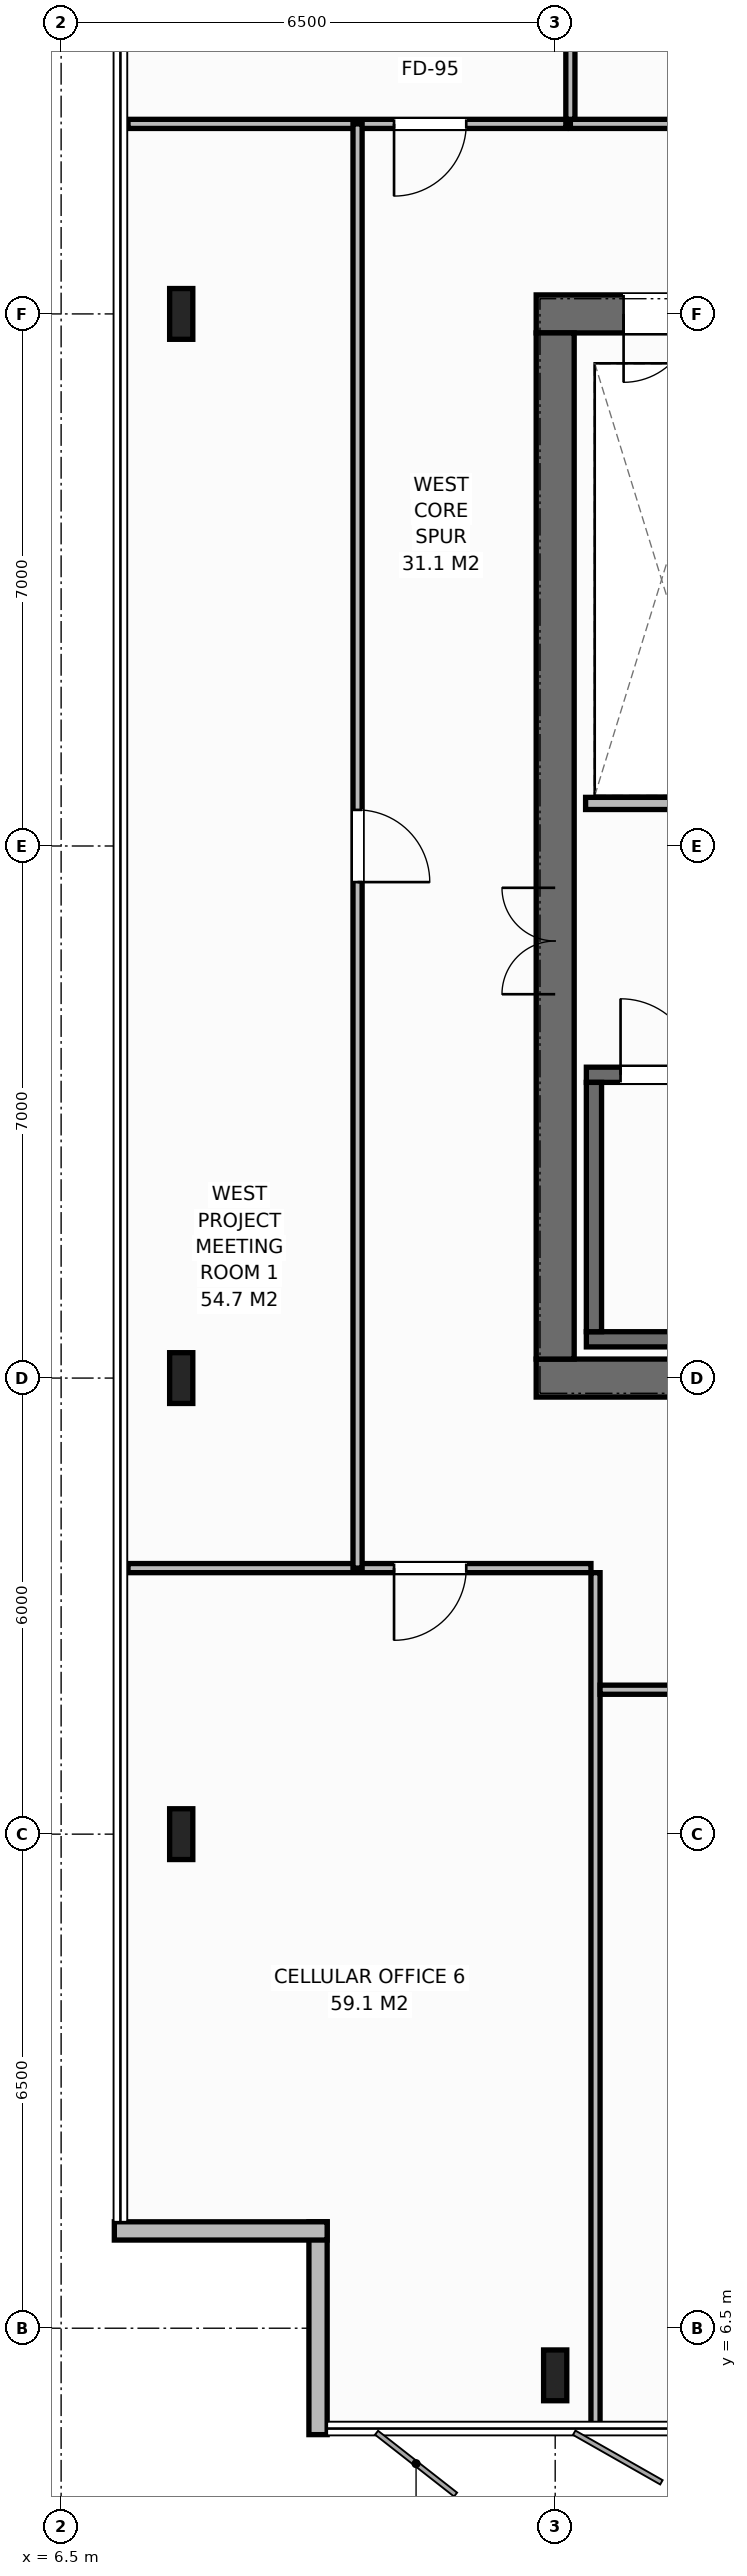
"""IFC4 building model, lengths in metres.
Left out: names, types, materials, properties, quantities, classifications, styles, units other than length and angle.
Written with IfcOpenShell. Run it as: python <this file> out.ifc"""

import sys

from ifc_helpers import new_model, si_unit, direction, frame, frame_2d, origin, origin_2d, place, context, subcontext, project, spatial, rectangle, i_section, extrude, element, fill, save


model = new_model("IFC4")
c1 = context("Model", 3, precision=1e-05, world=origin(), true_north=direction((0.0, 1.0)))
c2 = subcontext(c1, "Body", "Model", "MODEL_VIEW")
j1 = project(units=[si_unit("LENGTHUNIT", "METRE"), si_unit("PLANEANGLEUNIT", "RADIAN")], contexts=[c1])
p1 = place(None, origin())
s1 = spatial("IfcSite", under=j1, at=p1, CompositionType="ELEMENT")
p2 = place(p1, origin())
s2 = spatial("IfcBuilding", under=s1, at=p2, CompositionType="ELEMENT")
p3 = place(p2, frame((0.0, 0.0, 302.4)))
s3 = spatial("IfcBuildingStorey", under=s2, at=p3, CompositionType="ELEMENT", Elevation=302.4)
p4 = place(p3, frame((12.75, 19.0, 0.0), z_axis=(0.0, 0.0, 1.0), x_axis=(1.0, 0.0, 0.0)))
e1 = element("IfcWall", 1, at=p4, inside=s3, PredefinedType="SHEAR", context=c2, shape_type="SweptSolid", body=[
    extrude(rectangle(XDim=13.5, YDim=0.5, at=frame_2d((6.75, 0.0))), origin(), (0.0, 0.0, 1.0), 4.0),
])
p5 = place(p4, frame((9.13, 0.0, 0.0)))
e2 = element("IfcOpeningElement", 2, at=p5, cuts=e1, PredefinedType="OPENING", context=c2, shape_type="SweptSolid", body=[
    extrude(rectangle(XDim=1.4, YDim=2.2, at=frame_2d((0.7, 1.1))), frame((0.0, 0.26, 0.0), z_axis=(0.0, -1.0, 0.0), x_axis=(1.0, 0.0, 0.0)), (0.0, 0.0, 1.0), 0.52),
])
p6 = place(p3, frame((12.75, 33.0, 0.0), z_axis=(0.0, 0.0, 1.0), x_axis=(1.0, 0.0, 0.0)))
e3 = element("IfcWall", 3, at=p6, inside=s3, PredefinedType="SHEAR", context=c2, shape_type="SweptSolid", body=[
    extrude(rectangle(XDim=13.5, YDim=0.5, at=frame_2d((6.75, 0.0))), origin(), (0.0, 0.0, 1.0), 4.0),
])
p7 = place(p6, frame((1.15, 0.0, 0.0)))
e4 = element("IfcOpeningElement", 4, at=p7, cuts=e3, PredefinedType="OPENING", context=c2, shape_type="SweptSolid", body=[
    extrude(rectangle(XDim=0.9, YDim=2.15, at=frame_2d((0.45, 1.075))), frame((0.0, 0.26, 0.0), z_axis=(0.0, -1.0, 0.0), x_axis=(1.0, 0.0, 0.0)), (0.0, 0.0, 1.0), 0.52),
])
p8 = place(p6, frame((3.2, 0.0, 0.0)))
e5 = element("IfcOpeningElement", 5, at=p8, cuts=e3, PredefinedType="OPENING", context=c2, shape_type="SweptSolid", body=[
    extrude(rectangle(XDim=0.95, YDim=2.15, at=frame_2d((0.475, 1.075))), frame((0.0, 0.26, 0.0), z_axis=(0.0, -1.0, 0.0), x_axis=(1.0, 0.0, 0.0)), (0.0, 0.0, 1.0), 0.52),
])
p9 = place(p6, frame((6.05, 0.0, 0.0)))
e6 = element("IfcOpeningElement", 6, at=p9, cuts=e3, PredefinedType="OPENING", context=c2, shape_type="SweptSolid", body=[
    extrude(rectangle(XDim=0.95, YDim=2.15, at=frame_2d((0.475, 1.075))), frame((0.0, 0.26, 0.0), z_axis=(0.0, -1.0, 0.0), x_axis=(1.0, 0.0, 0.0)), (0.0, 0.0, 1.0), 0.52),
])
p10 = place(p6, frame((9.13, 0.0, 0.0)))
e7 = element("IfcOpeningElement", 7, at=p10, cuts=e3, PredefinedType="OPENING", context=c2, shape_type="SweptSolid", body=[
    extrude(rectangle(XDim=1.4, YDim=2.2, at=frame_2d((0.7, 1.1))), frame((0.0, 0.26, 0.0), z_axis=(0.0, -1.0, 0.0), x_axis=(1.0, 0.0, 0.0)), (0.0, 0.0, 1.0), 0.52),
])
p11 = place(p3, frame((13.0, 19.25, 0.0), z_axis=(0.0, 0.0, 1.0), x_axis=(0.0, 1.0, 0.0)))
e8 = element("IfcWall", 8, at=p11, inside=s3, PredefinedType="SHEAR", context=c2, shape_type="SweptSolid", body=[
    extrude(rectangle(XDim=13.5, YDim=0.5, at=frame_2d((6.75, 0.0))), origin(), (0.0, 0.0, 1.0), 4.0),
])
p12 = place(p11, frame((4.8, 0.0, 0.0)))
e9 = element("IfcOpeningElement", 9, at=p12, cuts=e8, PredefinedType="OPENING", context=c2, shape_type="SweptSolid", body=[
    extrude(rectangle(XDim=1.4, YDim=2.2, at=frame_2d((0.7, 1.1))), frame((0.0, 0.26, 0.0), z_axis=(0.0, -1.0, 0.0), x_axis=(1.0, 0.0, 0.0)), (0.0, 0.0, 1.0), 0.52),
])
p13 = place(p3, frame((13.41, 19.51, 0.0), z_axis=(0.0, 0.0, 1.0), x_axis=(1.0, 0.0, 0.0)))
e10 = element("IfcWall", 10, at=p13, inside=s3, PredefinedType="SHEAR", context=c2, shape_type="SweptSolid", body=[
    extrude(rectangle(XDim=8.43, YDim=0.2, at=frame_2d((4.215, 0.0))), origin(), (0.0, 0.0, 1.0), 4.0),
])
p14 = place(p3, frame((13.41, 22.99, 0.0), z_axis=(0.0, 0.0, 1.0), x_axis=(1.0, 0.0, 0.0)))
e11 = element("IfcWall", 11, at=p14, inside=s3, PredefinedType="SHEAR", context=c2, shape_type="SweptSolid", body=[
    extrude(rectangle(XDim=8.43, YDim=0.2, at=frame_2d((4.215, 0.0))), origin(), (0.0, 0.0, 1.0), 4.0),
])
p15 = place(p14, frame((0.45, 0.0, 0.0)))
e12 = element("IfcOpeningElement", 12, at=p15, cuts=e11, PredefinedType="OPENING", context=c2, shape_type="SweptSolid", body=[
    extrude(rectangle(XDim=1.0, YDim=2.15, at=frame_2d((0.5, 1.075))), frame((0.0, 0.11, 0.0), z_axis=(0.0, -1.0, 0.0), x_axis=(1.0, 0.0, 0.0)), (0.0, 0.0, 1.0), 0.22),
])
p16 = place(p3, frame((13.51, 19.61, 0.0), z_axis=(0.0, 0.0, 1.0), x_axis=(0.0, 1.0, 0.0)))
e13 = element("IfcWall", 13, at=p16, inside=s3, PredefinedType="SHEAR", context=c2, shape_type="SweptSolid", body=[
    extrude(rectangle(XDim=3.28, YDim=0.2, at=frame_2d((1.64, 0.0))), origin(), (0.0, 0.0, 1.0), 4.0),
])
for number, where, z_axis, x_axis in (
    (14, (13.0, 5.88, 0.0), (0.0, 0.0, 1.0), (1.0, 0.0, 0.0)),
    (15, (8.08, 13.0, 0.0), (0.0, 0.0, 1.0), (1.0, 0.0, 0.0)),
    (16, (8.08, 19.0, 0.0), (0.0, 0.0, 1.0), (1.0, 0.0, 0.0)),
    (17, (8.08, 33.0, 0.0), (0.0, 0.0, 1.0), (1.0, 0.0, 0.0)),
):
    element("IfcColumn", number, at=place(p3, frame(where, z_axis=z_axis, x_axis=x_axis)), inside=s3, PredefinedType="COLUMN", context=c2, shape_type="SweptSolid", body=[
        extrude(i_section(OverallWidth=0.305, OverallDepth=0.668, WebThickness=0.021, FlangeThickness=0.04, at=origin_2d()), origin(), (0.0, 0.0, 1.0), 4.0),
    ])
p17 = place(p3, frame((9.88, 5.1, 0.0), z_axis=(0.0, 0.0, 1.0), x_axis=(0.0, 1.0, 0.0)))
e18 = element("IfcWall", 18, at=p17, inside=s3, PredefinedType="STANDARD", context=c2, shape_type="SweptSolid", body=[
    extrude(rectangle(XDim=2.8, YDim=0.24, at=frame_2d((1.4, 0.0))), origin(), (0.0, 0.0, 1.0), 3.788),
])
p18 = place(p3, frame((10.0, 7.78, 0.0), z_axis=(0.0, 0.0, 1.0), x_axis=(-1.0, 0.0, 0.0)))
e19 = element("IfcWall", 19, at=p18, inside=s3, PredefinedType="STANDARD", context=c2, shape_type="SweptSolid", body=[
    extrude(rectangle(XDim=2.8, YDim=0.24, at=frame_2d((1.4, 0.0))), origin(), (0.0, 0.0, 1.0), 3.788),
])
p19 = place(p3, frame((13.4, 26.56, 0.0), z_axis=(0.0, 0.0, 1.0), x_axis=(1.0, 0.0, 0.0)))
e20 = element("IfcWall", 20, at=p19, inside=s3, PredefinedType="STANDARD", context=c2, shape_type="SweptSolid", body=[
    extrude(rectangle(XDim=8.34, YDim=0.16, at=frame_2d((4.17, 0.0))), origin(), (0.0, 0.0, 1.0), 3.788),
])
p20 = place(p3, frame((13.2, 35.5, 0.0), z_axis=(0.0, 0.0, 1.0), x_axis=(1.0, 0.0, 0.0)))
e21 = element("IfcWall", 21, at=p20, inside=s3, PredefinedType="PARTITIONING", context=c2, shape_type="SweptSolid", body=[
    extrude(rectangle(XDim=13.16, YDim=0.12, at=frame_2d((6.58, 0.0))), origin(), (0.0, 0.0, 1.0), 3.788),
])
p21 = place(p20, frame((1.35, 0.0, 0.0)))
e22 = element("IfcOpeningElement", 22, at=p21, cuts=e21, PredefinedType="OPENING", context=c2, shape_type="SweptSolid", body=[
    extrude(rectangle(XDim=0.9, YDim=2.15, at=frame_2d((0.45, 1.075))), frame((0.0, 0.07, 0.0), z_axis=(0.0, -1.0, 0.0), x_axis=(1.0, 0.0, 0.0)), (0.0, 0.0, 1.0), 0.14),
])
p22 = place(p20, frame((4.05, 0.0, 0.0)))
e23 = element("IfcOpeningElement", 23, at=p22, cuts=e21, PredefinedType="OPENING", context=c2, shape_type="SweptSolid", body=[
    extrude(rectangle(XDim=0.9, YDim=2.15, at=frame_2d((0.45, 1.075))), frame((0.0, 0.07, 0.0), z_axis=(0.0, -1.0, 0.0), x_axis=(1.0, 0.0, 0.0)), (0.0, 0.0, 1.0), 0.14),
])
p23 = place(p20, frame((8.25, 0.0, 0.0)))
e24 = element("IfcOpeningElement", 24, at=p23, cuts=e21, PredefinedType="OPENING", context=c2, shape_type="SweptSolid", body=[
    extrude(rectangle(XDim=0.9, YDim=2.15, at=frame_2d((0.45, 1.075))), frame((0.0, 0.07, 0.0), z_axis=(0.0, -1.0, 0.0), x_axis=(1.0, 0.0, 0.0)), (0.0, 0.0, 1.0), 0.14),
])
p24 = place(p20, frame((11.0, 0.0, 0.0)))
e25 = element("IfcOpeningElement", 25, at=p24, cuts=e21, PredefinedType="OPENING", context=c2, shape_type="SweptSolid", body=[
    extrude(rectangle(XDim=0.95, YDim=2.15, at=frame_2d((0.475, 1.075))), frame((0.0, 0.07, 0.0), z_axis=(0.0, -1.0, 0.0), x_axis=(1.0, 0.0, 0.0)), (0.0, 0.0, 1.0), 0.14),
])
p25 = place(p3, frame((13.2, 35.56, 0.0), z_axis=(0.0, 0.0, 1.0), x_axis=(0.0, 1.0, 0.0)))
e26 = element("IfcWall", 26, at=p25, inside=s3, PredefinedType="PARTITIONING", context=c2, shape_type="SweptSolid", body=[
    extrude(rectangle(XDim=11.32, YDim=0.12, at=frame_2d((5.66, 0.0))), origin(), (0.0, 0.0, 1.0), 2.988),
])
p26 = place(p3, frame((7.38, 35.5, 0.0), z_axis=(0.0, 0.0, 1.0), x_axis=(1.0, 0.0, 0.0)))
e27 = element("IfcWall", 27, at=p26, inside=s3, PredefinedType="PARTITIONING", context=c2, shape_type="SweptSolid", body=[
    extrude(rectangle(XDim=5.76, YDim=0.12, at=frame_2d((2.88, 0.0))), origin(), (0.0, 0.0, 1.0), 3.788),
])
p27 = place(p26, frame((3.5, 0.0, 0.0)))
e28 = element("IfcOpeningElement", 28, at=p27, cuts=e27, PredefinedType="OPENING", context=c2, shape_type="SweptSolid", body=[
    extrude(rectangle(XDim=0.95, YDim=2.15, at=frame_2d((0.475, 1.075))), frame((0.0, 0.07, 0.0), z_axis=(0.0, -1.0, 0.0), x_axis=(1.0, 0.0, 0.0)), (0.0, 0.0, 1.0), 0.14),
])
p28 = place(p3, frame((13.531, 5.12, 0.0), z_axis=(0.0, 0.0, 1.0), x_axis=(0.0, 1.0, 0.0)))
e29 = element("IfcWall", 29, at=p28, inside=s3, PredefinedType="PARTITIONING", context=c2, shape_type="SweptSolid", body=[
    extrude(rectangle(XDim=11.32, YDim=0.12, at=frame_2d((5.66, 0.0))), origin(), (0.0, 0.0, 1.0), 3.788),
])
p29 = place(p3, frame((7.38, 16.5, 0.0), z_axis=(0.0, 0.0, 1.0), x_axis=(1.0, 0.0, 0.0)))
e30 = element("IfcWall", 30, at=p29, inside=s3, PredefinedType="PARTITIONING", context=c2, shape_type="SweptSolid", body=[
    extrude(rectangle(XDim=6.091, YDim=0.12, at=frame_2d((3.045, 0.0))), origin(), (0.0, 0.0, 1.0), 3.788),
])
p30 = place(p29, frame((3.5, 0.0, 0.0)))
e31 = element("IfcOpeningElement", 31, at=p30, cuts=e30, PredefinedType="OPENING", context=c2, shape_type="SweptSolid", body=[
    extrude(rectangle(XDim=0.95, YDim=2.15, at=frame_2d((0.475, 1.075))), frame((0.0, 0.07, 0.0), z_axis=(0.0, -1.0, 0.0), x_axis=(1.0, 0.0, 0.0)), (0.0, 0.0, 1.0), 0.14),
])
p31 = place(p3, frame((13.591, 14.9, 0.0), z_axis=(0.0, 0.0, 1.0), x_axis=(1.0, 0.0, 0.0)))
e32 = element("IfcWall", 32, at=p31, inside=s3, PredefinedType="PARTITIONING", context=c2, shape_type="SweptSolid", body=[
    extrude(rectangle(XDim=4.574, YDim=0.12, at=frame_2d((2.287, 0.0))), origin(), (0.0, 0.0, 1.0), 3.788),
])
p32 = place(p31, frame((1.812, 0.0, 0.0)))
e33 = element("IfcOpeningElement", 33, at=p32, cuts=e32, PredefinedType="OPENING", context=c2, shape_type="SweptSolid", body=[
    extrude(rectangle(XDim=0.95, YDim=2.15, at=frame_2d((0.475, 1.075))), frame((0.0, 0.07, 0.0), z_axis=(0.0, -1.0, 0.0), x_axis=(1.0, 0.0, 0.0)), (0.0, 0.0, 1.0), 0.14),
])
p33 = place(p3, frame((10.4, 16.5, 0.0), z_axis=(0.0, 0.0, 1.0), x_axis=(0.0, 1.0, 0.0)))
e34 = element("IfcWall", 34, at=p33, inside=s3, PredefinedType="PARTITIONING", context=c2, shape_type="SweptSolid", body=[
    extrude(rectangle(XDim=19.0, YDim=0.12, at=frame_2d((9.5, 0.0))), origin(), (0.0, 0.0, 1.0), 3.788),
])
p34 = place(p33, frame((9.025, 0.0, 0.0)))
e35 = element("IfcOpeningElement", 35, at=p34, cuts=e34, PredefinedType="OPENING", context=c2, shape_type="SweptSolid", body=[
    extrude(rectangle(XDim=0.95, YDim=2.15, at=frame_2d((0.475, 1.075))), frame((0.0, 0.07, 0.0), z_axis=(0.0, -1.0, 0.0), x_axis=(1.0, 0.0, 0.0)), (0.0, 0.0, 1.0), 0.14),
])
p35 = place(p15, origin())
e36 = element("IfcDoor", 36, at=p35, inside=s3, OperationType="SINGLE_SWING_LEFT", PredefinedType="DOOR", context=c2, shape_type="SweptSolid", body=[
    extrude(rectangle(XDim=1.0, YDim=2.15, at=frame_2d((0.5, 1.075))), frame((0.0, 0.025, 0.0), z_axis=(0.0, -1.0, 0.0), x_axis=(1.0, 0.0, 0.0)), (0.0, 0.0, 1.0), 0.05),
])
fill(e12, e36)
p36 = place(p12, origin())
e37 = element("IfcDoor", 37, at=p36, inside=s3, OperationType="DOUBLE_DOOR_SINGLE_SWING", PredefinedType="DOOR", context=c2, shape_type="SweptSolid", body=[
    extrude(rectangle(XDim=1.4, YDim=2.2, at=frame_2d((0.7, 1.1))), frame((0.0, 0.025, 0.0), z_axis=(0.0, -1.0, 0.0), x_axis=(1.0, 0.0, 0.0)), (0.0, 0.0, 1.0), 0.05),
])
fill(e9, e37)
p37 = place(p7, origin())
e38 = element("IfcDoor", 38, at=p37, inside=s3, OperationType="SINGLE_SWING_RIGHT", PredefinedType="DOOR", context=c2, shape_type="SweptSolid", body=[
    extrude(rectangle(XDim=0.9, YDim=2.15, at=frame_2d((0.45, 1.075))), frame((0.0, -0.025, 0.0), z_axis=(0.0, -1.0, 0.0), x_axis=(1.0, 0.0, 0.0)), (0.0, 0.0, 1.0), 0.05),
])
fill(e4, e38)
p38 = place(p27, origin())
e39 = element("IfcDoor", 39, at=p38, inside=s3, OperationType="SINGLE_SWING_RIGHT", PredefinedType="DOOR", context=c2, shape_type="SweptSolid", body=[
    extrude(rectangle(XDim=0.95, YDim=2.15, at=frame_2d((0.475, 1.075))), frame((0.0, 0.025, 0.0), z_axis=(0.0, -1.0, 0.0), x_axis=(1.0, 0.0, 0.0)), (0.0, 0.0, 1.0), 0.05),
])
fill(e28, e39)
p39 = place(p30, origin())
e40 = element("IfcDoor", 40, at=p39, inside=s3, OperationType="SINGLE_SWING_RIGHT", PredefinedType="DOOR", context=c2, shape_type="SweptSolid", body=[
    extrude(rectangle(XDim=0.95, YDim=2.15, at=frame_2d((0.475, 1.075))), frame((0.0, 0.025, 0.0), z_axis=(0.0, -1.0, 0.0), x_axis=(1.0, 0.0, 0.0)), (0.0, 0.0, 1.0), 0.05),
])
fill(e31, e40)
p40 = place(p34, origin())
e41 = element("IfcDoor", 41, at=p40, inside=s3, OperationType="SINGLE_SWING_RIGHT", PredefinedType="DOOR", context=c2, shape_type="SweptSolid", body=[
    extrude(rectangle(XDim=0.95, YDim=2.15, at=frame_2d((0.475, 1.075))), frame((0.0, 0.025, 0.0), z_axis=(0.0, -1.0, 0.0), x_axis=(1.0, 0.0, 0.0)), (0.0, 0.0, 1.0), 0.05),
])
fill(e35, e41)
save(model, sys.argv[1])
